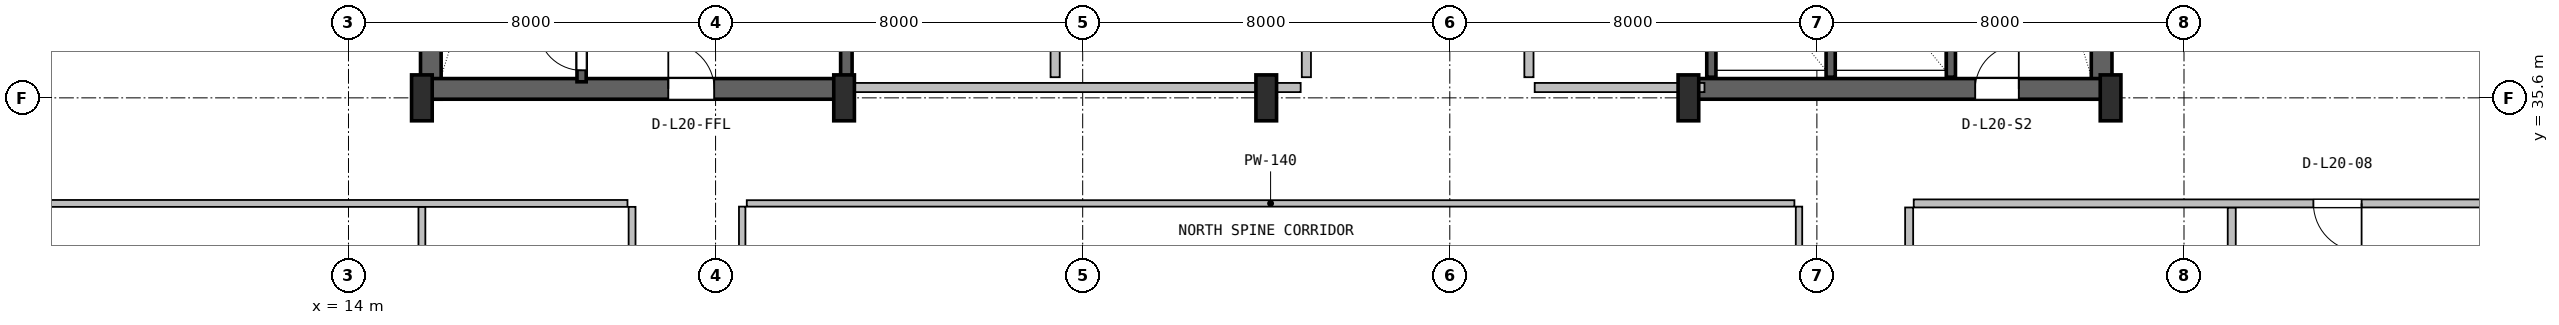
"""IFC4 building model, lengths in metres.
Left out: names, types, materials, properties, quantities, classifications, styles, units other than length and angle.
Written with IfcOpenShell. Run it as: python <this file> out.ifc"""

import sys

from ifc_helpers import new_model, si_unit, direction, frame, frame_2d, origin, origin_2d, place, context, subcontext, project, spatial, rectangle, i_section, extrude, source, transform, mapped, element, fill, save


model = new_model("IFC4")
c1 = context("Model", 3, precision=1e-05, world=origin(), true_north=direction((0.0, 1.0)))
c2 = subcontext(c1, "Body", "Model", "MODEL_VIEW")
j1 = project(units=[si_unit("LENGTHUNIT", "METRE"), si_unit("PLANEANGLEUNIT", "RADIAN")], contexts=[c1])
p1 = place(None, origin())
s1 = spatial("IfcSite", under=j1, at=p1, CompositionType="ELEMENT")
p2 = place(p1, origin())
s2 = spatial("IfcBuilding", under=s1, at=p2, CompositionType="ELEMENT")
p3 = place(p2, frame((0.0, 0.0, 87.0)))
s3 = spatial("IfcBuildingStorey", under=s2, at=p3, CompositionType="ELEMENT", Elevation=87.0)
for number, where, z_axis, x_axis in (
    (1, (15.795, 35.57, 0.0), (0.0, 0.0, 1.0), (0.0, 1.0, 0.0)),
    (2, (52.205, 35.57, 0.0), (0.0, 0.0, 1.0), (0.0, 1.0, 0.0)),
):
    element("IfcWall", number, at=place(p3, frame(where, z_axis=z_axis, x_axis=x_axis)), inside=s3, PredefinedType="SHEAR", context=c2, shape_type="SweptSolid", body=[
        extrude(rectangle(XDim=11.23, YDim=0.45, at=frame_2d((5.615, 0.0))), origin(), (0.0, 0.0, 1.0), 3.55),
    ])
p4 = place(p3, frame((15.57, 35.795, 0.0), z_axis=(0.0, 0.0, 1.0), x_axis=(1.0, 0.0, 0.0)))
e3 = element("IfcWall", 3, at=p4, inside=s3, PredefinedType="SHEAR", context=c2, shape_type="SweptSolid", body=[
    extrude(rectangle(XDim=9.23, YDim=0.45, at=frame_2d((4.615, 0.0))), origin(), (0.0, 0.0, 1.0), 3.55),
])
p5 = place(p4, frame((5.4, 0.0, 0.0)))
e4 = element("IfcOpeningElement", 4, at=p5, cuts=e3, PredefinedType="OPENING", context=c2, shape_type="SweptSolid", body=[
    extrude(rectangle(XDim=1.0, YDim=2.1, at=frame_2d((0.5, 1.05))), frame((0.0, 0.235, 0.0), z_axis=(0.0, -1.0, 0.0), x_axis=(1.0, 0.0, 0.0)), (0.0, 0.0, 1.0), 0.47),
])
p6 = place(p3, frame((43.2, 35.795, 0.0), z_axis=(0.0, 0.0, 1.0), x_axis=(1.0, 0.0, 0.0)))
e5 = element("IfcWall", 5, at=p6, inside=s3, PredefinedType="SHEAR", context=c2, shape_type="SweptSolid", body=[
    extrude(rectangle(XDim=9.23, YDim=0.45, at=frame_2d((4.615, 0.0))), origin(), (0.0, 0.0, 1.0), 3.55),
])
p7 = place(p6, frame((6.25, 0.0, 0.0)))
e6 = element("IfcOpeningElement", 6, at=p7, cuts=e5, PredefinedType="OPENING", context=c2, shape_type="SweptSolid", body=[
    extrude(rectangle(XDim=0.95, YDim=2.1, at=frame_2d((0.475, 1.05))), frame((0.0, 0.235, 0.0), z_axis=(0.0, -1.0, 0.0), x_axis=(1.0, 0.0, 0.0)), (0.0, 0.0, 1.0), 0.47),
])
m1 = source(origin(), c2, "Body", "SweptSolid", [
    extrude(i_section(OverallWidth=0.45, OverallDepth=1.0, WebThickness=0.016, FlangeThickness=0.03, FilletRadius=0.016, at=origin_2d()), origin(), (0.0, 0.0, 1.0), 3.8),
])
for number, where, z_axis, x_axis in (
    (7, (15.6, 35.6, 0.0), (0.0, 0.0, 1.0), (1.0, 0.0, 0.0)),
    (8, (24.8, 35.6, 0.0), (0.0, 0.0, 1.0), (1.0, 0.0, 0.0)),
    (9, (34.0, 35.6, 0.0), (0.0, 0.0, 1.0), (1.0, 0.0, 0.0)),
    (10, (43.2, 35.6, 0.0), (0.0, 0.0, 1.0), (1.0, 0.0, 0.0)),
    (11, (52.4, 35.6, 0.0), (0.0, 0.0, 1.0), (1.0, 0.0, 0.0)),
):
    element("IfcColumn", number, at=place(p3, frame(where, z_axis=z_axis, x_axis=x_axis)), inside=s3, PredefinedType="COLUMN", context=c2, shape_type="MappedRepresentation", body=[
        mapped(m1, transform((0.0, 0.0, 0.0), x_axis=(1.0, 0.0, 0.0), y_axis=(0.0, 1.0, 0.0), z_axis=(0.0, 0.0, 1.0), scale=1.0)),
    ])
p8 = place(p3, frame((19.08, 35.95, 0.0), z_axis=(0.0, 0.0, 1.0), x_axis=(0.0, 1.0, 0.0)))
e12 = element("IfcWall", 12, at=p8, inside=s3, PredefinedType="SHEAR", context=c2, shape_type="SweptSolid", body=[
    extrude(rectangle(XDim=9.65, YDim=0.2, at=frame_2d((4.825, 0.0))), origin(), (0.0, 0.0, 1.0), 3.55),
])
p9 = place(p8, frame((0.25, 0.0, 0.0)))
e13 = element("IfcOpeningElement", 13, at=p9, cuts=e12, PredefinedType="OPENING", context=c2, shape_type="SweptSolid", body=[
    extrude(rectangle(XDim=0.95, YDim=2.1, at=frame_2d((0.475, 1.05))), frame((0.0, 0.11, 0.0), z_axis=(0.0, -1.0, 0.0), x_axis=(1.0, 0.0, 0.0)), (0.0, 0.0, 1.0), 0.22),
])
p10 = place(p3, frame((24.85, 36.05, 0.0), z_axis=(0.0, 0.0, 1.0), x_axis=(0.0, 1.0, 0.0)))
e14 = element("IfcWall", 14, at=p10, inside=s3, PredefinedType="SHEAR", context=c2, shape_type="SweptSolid", body=[
    extrude(rectangle(XDim=10.45, YDim=0.25, at=frame_2d((5.225, 0.0))), origin(), (0.0, 0.0, 1.0), 3.55),
])
p11 = place(p3, frame((48.92, 36.05, 0.0), z_axis=(0.0, 0.0, 1.0), x_axis=(0.0, 1.0, 0.0)))
e15 = element("IfcWall", 15, at=p11, inside=s3, PredefinedType="SHEAR", context=c2, shape_type="SweptSolid", body=[
    extrude(rectangle(XDim=10.5, YDim=0.2, at=frame_2d((5.25, 0.0))), origin(), (0.0, 0.0, 1.0), 3.55),
])
for number, where, z_axis, x_axis in (
    (16, (43.7, 36.05, 0.0), (0.0, 0.0, 1.0), (0.0, 1.0, 0.0)),
    (17, (46.3, 36.05, 0.0), (0.0, 0.0, 1.0), (0.0, 1.0, 0.0)),
):
    element("IfcWall", number, at=place(p3, frame(where, z_axis=z_axis, x_axis=x_axis)), inside=s3, PredefinedType="SHEAR", context=c2, shape_type="SweptSolid", body=[
        extrude(rectangle(XDim=3.05, YDim=0.2, at=frame_2d((1.525, 0.0))), origin(), (0.0, 0.0, 1.0), 3.55),
    ])
p12 = place(p3, frame((25.0, 35.825, 0.0), z_axis=(0.0, 0.0, 1.0), x_axis=(1.0, 0.0, 0.0)))
e18 = element("IfcWall", 18, at=p12, inside=s3, PredefinedType="PLUMBINGWALL", context=c2, shape_type="SweptSolid", body=[
    extrude(rectangle(XDim=9.75, YDim=0.2, at=frame_2d((4.875, 0.0))), origin(), (0.0, 0.0, 1.0), 2.325),
])
for number, where, z_axis, x_axis in (
    (19, (29.4, 36.05, 0.0), (0.0, 0.0, 1.0), (0.0, 1.0, 0.0)),
    (20, (34.875, 36.05, 0.0), (0.0, 0.0, 1.0), (0.0, 1.0, 0.0)),
):
    element("IfcWall", number, at=place(p3, frame(where, z_axis=z_axis, x_axis=x_axis)), inside=s3, PredefinedType="PLUMBINGWALL", context=c2, shape_type="SweptSolid", body=[
        extrude(rectangle(XDim=3.1, YDim=0.2, at=frame_2d((1.55, 0.0))), origin(), (0.0, 0.0, 1.0), 3.53),
    ])
p13 = place(p3, frame((39.85, 35.825, 0.0), z_axis=(0.0, 0.0, 1.0), x_axis=(1.0, 0.0, 0.0)))
e21 = element("IfcWall", 21, at=p13, inside=s3, PredefinedType="SOLIDWALL", context=c2, shape_type="SweptSolid", body=[
    extrude(rectangle(XDim=3.7, YDim=0.2, at=frame_2d((1.85, 0.0))), origin(), (0.0, 0.0, 1.0), 2.325),
])
p14 = place(p3, frame((39.725, 36.05, 0.0), z_axis=(0.0, 0.0, 1.0), x_axis=(0.0, 1.0, 0.0)))
e22 = element("IfcWall", 22, at=p14, inside=s3, PredefinedType="SOLIDWALL", context=c2, shape_type="SweptSolid", body=[
    extrude(rectangle(XDim=3.1, YDim=0.2, at=frame_2d((1.55, 0.0))), origin(), (0.0, 0.0, 1.0), 3.53),
])
p15 = place(p3, frame((20.18, 5.55, 0.0), z_axis=(0.0, 0.0, 1.0), x_axis=(0.0, 1.0, 0.0)))
e23 = element("IfcWall", 23, at=p15, inside=s3, PredefinedType="PARTITIONING", context=c2, shape_type="SweptSolid", body=[
    extrude(rectangle(XDim=27.675, YDim=0.15, at=frame_2d((13.837, 0.0))), origin(), (0.0, 0.0, 1.0), 3.222),
])
p16 = place(p15, frame((4.54, 0.0, 0.0)))
e24 = element("IfcOpeningElement", 24, at=p16, cuts=e23, PredefinedType="OPENING", context=c2, shape_type="SweptSolid", body=[
    extrude(rectangle(XDim=0.92, YDim=2.08, at=frame_2d((0.46, 1.04))), frame((0.0, 0.085, 0.0), z_axis=(0.0, -1.0, 0.0), x_axis=(1.0, 0.0, 0.0)), (0.0, 0.0, 1.0), 0.17),
])
p17 = place(p15, frame((18.4, 0.0, 0.0)))
e25 = element("IfcOpeningElement", 25, at=p17, cuts=e23, PredefinedType="OPENING", context=c2, shape_type="SweptSolid", body=[
    extrude(rectangle(XDim=1.05, YDim=2.1, at=frame_2d((0.525, 1.05))), frame((0.0, 0.085, 0.0), z_axis=(0.0, -1.0, 0.0), x_axis=(1.0, 0.0, 0.0)), (0.0, 0.0, 1.0), 0.17),
])
p18 = place(p3, frame((15.6, 15.625, 0.0), z_axis=(0.0, 0.0, 1.0), x_axis=(0.0, 1.0, 0.0)))
e26 = element("IfcWall", 26, at=p18, inside=s3, PredefinedType="PARTITIONING", context=c2, shape_type="SweptSolid", body=[
    extrude(rectangle(XDim=17.6, YDim=0.15, at=frame_2d((8.8, 0.0))), origin(), (0.0, 0.0, 1.0), 3.222),
])
p19 = place(p3, frame((4.68, 33.3, 0.0), z_axis=(0.0, 0.0, 1.0), x_axis=(1.0, 0.0, 0.0)))
e27 = element("IfcWall", 27, at=p19, inside=s3, PredefinedType="PARTITIONING", context=c2, shape_type="SweptSolid", body=[
    extrude(rectangle(XDim=15.4, YDim=0.15, at=frame_2d((7.7, 0.0))), origin(), (0.0, 0.0, 1.0), 3.108),
])
p20 = place(p3, frame((45.61, 4.38, 0.0), z_axis=(0.0, 0.0, 1.0), x_axis=(0.0, 1.0, 0.0)))
e28 = element("IfcWall", 28, at=p20, inside=s3, PredefinedType="PARTITIONING", context=c2, shape_type="SweptSolid", body=[
    extrude(rectangle(XDim=28.85, YDim=0.14, at=frame_2d((14.425, 0.0))), origin(), (0.0, 0.0, 1.0), 3.108),
])
p21 = place(p20, frame((14.415, 0.0, 0.0)))
e29 = element("IfcOpeningElement", 29, at=p21, cuts=e28, PredefinedType="OPENING", context=c2, shape_type="SweptSolid", body=[
    extrude(rectangle(XDim=1.0, YDim=2.1, at=frame_2d((0.5, 1.05))), frame((0.0, 0.08, 0.0), z_axis=(0.0, -1.0, 0.0), x_axis=(1.0, 0.0, 0.0)), (0.0, 0.0, 1.0), 0.16),
])
p22 = place(p3, frame((22.68, 33.3, 0.0), z_axis=(0.0, 0.0, 1.0), x_axis=(1.0, 0.0, 0.0)))
e30 = element("IfcWall", 30, at=p22, inside=s3, PredefinedType="PARTITIONING", context=c2, shape_type="SweptSolid", body=[
    extrude(rectangle(XDim=22.83, YDim=0.14, at=frame_2d((11.415, 0.0))), origin(), (0.0, 0.0, 1.0), 2.83),
])
p23 = place(p3, frame((22.58, 4.38, 0.0), z_axis=(0.0, 0.0, 1.0), x_axis=(0.0, 1.0, 0.0)))
e31 = element("IfcWall", 31, at=p23, inside=s3, PredefinedType="PARTITIONING", context=c2, shape_type="SweptSolid", body=[
    extrude(rectangle(XDim=28.85, YDim=0.14, at=frame_2d((14.425, 0.0))), origin(), (0.0, 0.0, 1.0), 3.108),
])
p24 = place(p3, frame((55.04, 4.38, 0.0), z_axis=(0.0, 0.0, 1.0), x_axis=(0.0, 1.0, 0.0)))
e32 = element("IfcWall", 32, at=p24, inside=s3, PredefinedType="PARTITIONING", context=c2, shape_type="SweptSolid", body=[
    extrude(rectangle(XDim=28.832, YDim=0.175, at=frame_2d((14.416, 0.0))), origin(), (0.0, 0.0, 1.0), 3.108),
])
p25 = place(p3, frame((48.11, 33.3, 0.0), z_axis=(0.0, 0.0, 1.0), x_axis=(1.0, 0.0, 0.0)))
e33 = element("IfcWall", 33, at=p25, inside=s3, PredefinedType="PARTITIONING", context=c2, shape_type="SweptSolid", body=[
    extrude(rectangle(XDim=15.21, YDim=0.175, at=frame_2d((7.605, 0.0))), origin(), (0.0, 0.0, 1.0), 3.108),
])
p26 = place(p25, frame((8.71, 0.0, 0.0)))
e34 = element("IfcOpeningElement", 34, at=p26, cuts=e33, PredefinedType="OPENING", context=c2, shape_type="SweptSolid", body=[
    extrude(rectangle(XDim=1.05, YDim=2.1, at=frame_2d((0.525, 1.05))), frame((0.0, 0.098, 0.0), z_axis=(0.0, -1.0, 0.0), x_axis=(1.0, 0.0, 0.0)), (0.0, 0.0, 1.0), 0.195),
])
p27 = place(p3, frame((48.01, 4.38, 0.0), z_axis=(0.0, 0.0, 1.0), x_axis=(0.0, 1.0, 0.0)))
e35 = element("IfcWall", 35, at=p27, inside=s3, PredefinedType="PARTITIONING", context=c2, shape_type="SweptSolid", body=[
    extrude(rectangle(XDim=28.832, YDim=0.175, at=frame_2d((14.416, 0.0))), origin(), (0.0, 0.0, 1.0), 3.108),
])
p28 = place(p27, frame((14.39, 0.0, 0.0)))
e36 = element("IfcOpeningElement", 36, at=p28, cuts=e35, PredefinedType="OPENING", context=c2, shape_type="SweptSolid", body=[
    extrude(rectangle(XDim=1.05, YDim=2.1, at=frame_2d((0.525, 1.05))), frame((0.0, 0.098, 0.0), z_axis=(0.0, -1.0, 0.0), x_axis=(1.0, 0.0, 0.0)), (0.0, 0.0, 1.0), 0.195),
])
m2 = source(origin(), c2, "Body", "SweptSolid", [
    extrude(rectangle(XDim=0.95, YDim=2.1, at=frame_2d((0.475, 1.05))), frame((0.0, 0.025, 0.0), z_axis=(0.0, -1.0, 0.0), x_axis=(1.0, 0.0, 0.0)), (0.0, 0.0, 1.0), 0.05),
])
p29 = place(p9, origin())
e37 = element("IfcDoor", 37, at=p29, inside=s3, OperationType="SINGLE_SWING_RIGHT", PredefinedType="DOOR", context=c2, shape_type="MappedRepresentation", body=[
    mapped(m2, transform((0.0, 0.0, 0.0), x_axis=(1.0, 0.0, 0.0), y_axis=(0.0, 1.0, 0.0), z_axis=(0.0, 0.0, 1.0), scale=1.0)),
])
fill(e13, e37)
m3 = source(origin(), c2, "Body", "SweptSolid", [
    extrude(rectangle(XDim=1.0, YDim=2.1, at=frame_2d((0.5, 1.05))), frame((0.0, 0.025, 0.0), z_axis=(0.0, -1.0, 0.0), x_axis=(1.0, 0.0, 0.0)), (0.0, 0.0, 1.0), 0.05),
])
p30 = place(p5, origin())
e38 = element("IfcDoor", 38, at=p30, inside=s3, OperationType="SINGLE_SWING_LEFT", PredefinedType="DOOR", context=c2, shape_type="MappedRepresentation", body=[
    mapped(m3, transform((0.0, 0.0, 0.0), x_axis=(1.0, 0.0, 0.0), y_axis=(0.0, 1.0, 0.0), z_axis=(0.0, 0.0, 1.0), scale=1.0)),
])
fill(e4, e38)
p31 = place(p7, origin())
e39 = element("IfcDoor", 39, at=p31, inside=s3, OperationType="SINGLE_SWING_RIGHT", PredefinedType="DOOR", context=c2, shape_type="MappedRepresentation", body=[
    mapped(m2, transform((0.0, 0.0, 0.0), x_axis=(1.0, 0.0, 0.0), y_axis=(0.0, 1.0, 0.0), z_axis=(0.0, 0.0, 1.0), scale=1.0)),
])
fill(e6, e39)
m4 = source(origin(), c2, "Body", "SweptSolid", [
    extrude(rectangle(XDim=1.05, YDim=2.1, at=frame_2d((0.525, 1.05))), frame((0.0, 0.025, 0.0), z_axis=(0.0, -1.0, 0.0), x_axis=(1.0, 0.0, 0.0)), (0.0, 0.0, 1.0), 0.05),
])
p32 = place(p26, frame((1.05, 0.0, 0.0), z_axis=(0.0, 0.0, 1.0), x_axis=(-1.0, 0.0, 0.0)))
e40 = element("IfcDoor", 40, at=p32, inside=s3, OperationType="SINGLE_SWING_RIGHT", PredefinedType="DOOR", context=c2, shape_type="MappedRepresentation", body=[
    mapped(m4, transform((0.0, 0.0, 0.0), x_axis=(1.0, 0.0, 0.0), y_axis=(0.0, 1.0, 0.0), z_axis=(0.0, 0.0, 1.0), scale=1.0)),
])
fill(e34, e40)
save(model, sys.argv[1])
